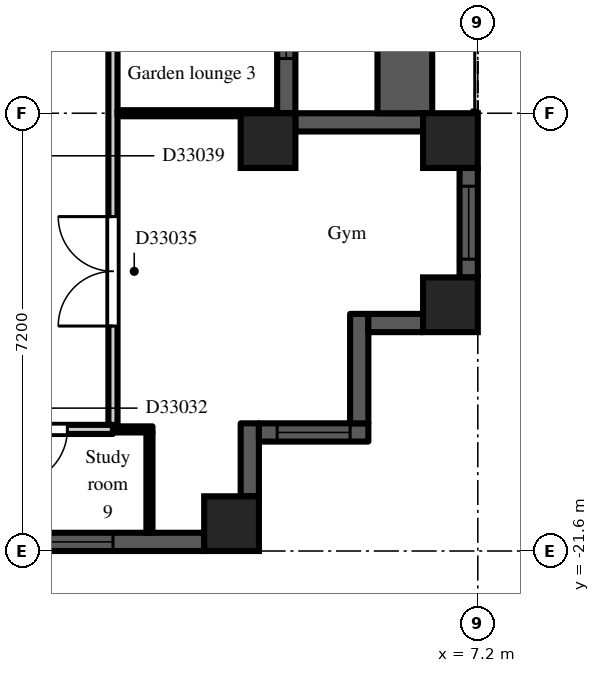
"""IFC4 building model, lengths in metres.
Left out: names, types, materials, properties, quantities, classifications, styles, units other than length and angle.
Written with IfcOpenShell. Run it as: python <this file> out.ifc"""

import sys

from ifc_helpers import new_model, si_unit, direction, frame, frame_2d, origin, origin_2d, place, context, subcontext, project, spatial, rectangle, extrude, element, fill, save


model = new_model("IFC4")
c1 = context("Model", 3, precision=1e-05, world=origin(), true_north=direction((0.0, 1.0)))
c2 = subcontext(c1, "Body", "Model", "MODEL_VIEW")
j1 = project(units=[si_unit("LENGTHUNIT", "METRE"), si_unit("PLANEANGLEUNIT", "RADIAN")], contexts=[c1])
p1 = place(None, origin())
s1 = spatial("IfcSite", under=j1, at=p1, CompositionType="ELEMENT")
p2 = place(p1, origin())
s2 = spatial("IfcBuilding", under=s1, at=p2, CompositionType="ELEMENT")
p3 = place(p2, frame((0.0, 0.0, 231.9)))
s3 = spatial("IfcBuildingStorey", under=s2, at=p3, CompositionType="ELEMENT", Elevation=231.9)
for number, where, z_axis, x_axis in (
    (1, (3.15, -21.15, 0.0), (0.0, 0.0, 1.0), (1.0, 0.0, 0.0)),
    (2, (3.75, -14.85, 0.0), (0.0, 0.0, 1.0), (1.0, 0.0, 0.0)),
    (3, (6.75, -17.55, 0.0), (0.0, 0.0, 1.0), (1.0, 0.0, 0.0)),
    (4, (6.75, -14.85, 0.0), (0.0, 0.0, 1.0), (1.0, 0.0, 0.0)),
):
    element("IfcColumn", number, at=place(p3, frame(where, z_axis=z_axis, x_axis=x_axis)), inside=s3, PredefinedType="COLUMN", context=c2, shape_type="SweptSolid", body=[
        extrude(rectangle(XDim=0.9, YDim=0.9, at=origin_2d()), origin(), (0.0, 0.0, 1.0), 3.0),
    ])
p4 = place(p3, frame((-2.7, -21.45, 0.0), z_axis=(0.0, 0.0, 1.0), x_axis=(1.0, 0.0, 0.0)))
e5 = element("IfcWall", 5, at=p4, inside=s3, PredefinedType="SOLIDWALL", context=c2, shape_type="SweptSolid", body=[
    extrude(rectangle(XDim=5.4, YDim=0.3, at=frame_2d((2.7, 0.0))), origin(), (0.0, 0.0, 1.0), 2.3),
])
p5 = place(p4, frame((1.5, 0.0, 0.2)))
e6 = element("IfcOpeningElement", 6, at=p5, cuts=e5, PredefinedType="OPENING", context=c2, shape_type="SweptSolid", body=[
    extrude(rectangle(XDim=2.4, YDim=1.85, at=frame_2d((1.2, 0.925))), frame((0.0, 0.16, 0.0), z_axis=(0.0, -1.0, 0.0), x_axis=(1.0, 0.0, 0.0)), (0.0, 0.0, 1.0), 0.32),
])
p6 = place(p3, frame((3.45, -20.7, 0.0), z_axis=(0.0, 0.0, 1.0), x_axis=(0.0, 1.0, 0.0)))
e7 = element("IfcWall", 7, at=p6, inside=s3, PredefinedType="SOLIDWALL", context=c2, shape_type="SweptSolid", body=[
    extrude(rectangle(XDim=1.2, YDim=0.3, at=frame_2d((0.6, 0.0))), origin(), (0.0, 0.0, 1.0), 2.6),
])
p7 = place(p3, frame((3.6, -19.65, 0.0), z_axis=(0.0, 0.0, 1.0), x_axis=(1.0, 0.0, 0.0)))
e8 = element("IfcWall", 8, at=p7, inside=s3, PredefinedType="SOLIDWALL", context=c2, shape_type="SweptSolid", body=[
    extrude(rectangle(XDim=1.8, YDim=0.3, at=frame_2d((0.9, 0.0))), origin(), (0.0, 0.0, 1.0), 2.6),
])
p8 = place(p7, frame((0.3, 0.0, 0.2)))
e9 = element("IfcOpeningElement", 9, at=p8, cuts=e8, PredefinedType="OPENING", context=c2, shape_type="SweptSolid", body=[
    extrude(rectangle(XDim=1.2, YDim=1.85, at=frame_2d((0.6, 0.925))), frame((0.0, 0.16, 0.0), z_axis=(0.0, -1.0, 0.0), x_axis=(1.0, 0.0, 0.0)), (0.0, 0.0, 1.0), 0.32),
])
p9 = place(p3, frame((5.25, -19.5, 0.0), z_axis=(0.0, 0.0, 1.0), x_axis=(0.0, 1.0, 0.0)))
e10 = element("IfcWall", 10, at=p9, inside=s3, PredefinedType="SOLIDWALL", context=c2, shape_type="SweptSolid", body=[
    extrude(rectangle(XDim=1.8, YDim=0.3, at=frame_2d((0.9, 0.0))), origin(), (0.0, 0.0, 1.0), 2.6),
])
p10 = place(p3, frame((5.4, -17.85, 0.0), z_axis=(0.0, 0.0, 1.0), x_axis=(1.0, 0.0, 0.0)))
e11 = element("IfcWall", 11, at=p10, inside=s3, PredefinedType="SOLIDWALL", context=c2, shape_type="SweptSolid", body=[
    extrude(rectangle(XDim=0.9, YDim=0.3, at=frame_2d((0.45, 0.0))), origin(), (0.0, 0.0, 1.0), 2.6),
])
p11 = place(p3, frame((7.05, -17.1, 0.0), z_axis=(0.0, 0.0, 1.0), x_axis=(0.0, 1.0, 0.0)))
e12 = element("IfcWall", 12, at=p11, inside=s3, PredefinedType="SOLIDWALL", context=c2, shape_type="SweptSolid", body=[
    extrude(rectangle(XDim=1.8, YDim=0.3, at=frame_2d((0.9, 0.0))), origin(), (0.0, 0.0, 1.0), 2.3),
])
p12 = place(p11, frame((0.3, 0.0, 0.2)))
e13 = element("IfcOpeningElement", 13, at=p12, cuts=e12, PredefinedType="OPENING", context=c2, shape_type="SweptSolid", body=[
    extrude(rectangle(XDim=1.2, YDim=1.85, at=frame_2d((0.6, 0.925))), frame((0.0, 0.16, 0.0), z_axis=(0.0, -1.0, 0.0), x_axis=(1.0, 0.0, 0.0)), (0.0, 0.0, 1.0), 0.32),
])
p13 = place(p3, frame((6.3, -14.55, 0.0), z_axis=(0.0, 0.0, 1.0), x_axis=(-1.0, 0.0, 0.0)))
e14 = element("IfcWall", 14, at=p13, inside=s3, PredefinedType="SOLIDWALL", context=c2, shape_type="SweptSolid", body=[
    extrude(rectangle(XDim=2.1, YDim=0.3, at=frame_2d((1.05, 0.0))), origin(), (0.0, 0.0, 1.0), 2.3),
])
p14 = place(p3, frame((4.05, -14.4, 0.0), z_axis=(0.0, 0.0, 1.0), x_axis=(0.0, 1.0, 0.0)))
e15 = element("IfcWall", 15, at=p14, inside=s3, PredefinedType="SOLIDWALL", context=c2, shape_type="SweptSolid", body=[
    extrude(rectangle(XDim=7.2, YDim=0.3, at=frame_2d((3.6, 0.0))), origin(), (0.0, 0.0, 1.0), 2.3),
])
p15 = place(p14, frame((3.0, 0.0, 0.0)))
e16 = element("IfcOpeningElement", 16, at=p15, cuts=e15, PredefinedType="OPENING", context=c2, shape_type="SweptSolid", body=[
    extrude(rectangle(XDim=1.2, YDim=2.05, at=frame_2d((0.6, 1.025))), frame((0.0, 0.16, 0.0), z_axis=(0.0, -1.0, 0.0), x_axis=(1.0, 0.0, 0.0)), (0.0, 0.0, 1.0), 0.32),
])
p16 = place(p14, frame((0.9, 0.0, 0.2)))
e17 = element("IfcOpeningElement", 17, at=p16, cuts=e15, PredefinedType="OPENING", context=c2, shape_type="SweptSolid", body=[
    extrude(rectangle(XDim=1.8, YDim=1.85, at=frame_2d((0.9, 0.925))), frame((0.0, 0.16, 0.0), z_axis=(0.0, -1.0, 0.0), x_axis=(1.0, 0.0, 0.0)), (0.0, 0.0, 1.0), 0.32),
])
p17 = place(p14, frame((4.5, 0.0, 0.2)))
e18 = element("IfcOpeningElement", 18, at=p17, cuts=e15, PredefinedType="OPENING", context=c2, shape_type="SweptSolid", body=[
    extrude(rectangle(XDim=1.8, YDim=1.85, at=frame_2d((0.9, 0.925))), frame((0.0, 0.16, 0.0), z_axis=(0.0, -1.0, 0.0), x_axis=(1.0, 0.0, 0.0)), (0.0, 0.0, 1.0), 0.32),
])
p18 = place(p3, frame((6.0, -14.4, 0.0), z_axis=(0.0, 0.0, 1.0), x_axis=(0.0, 1.0, 0.0)))
e19 = element("IfcWall", 19, at=p18, inside=s3, PredefinedType="PARAPET", context=c2, shape_type="SweptSolid", body=[
    extrude(rectangle(XDim=7.2, YDim=0.9, at=frame_2d((3.6, 0.0))), origin(), (0.0, 0.0, 1.0), 0.8),
])
p19 = place(p3, frame((-1.2, -19.6, 0.0), z_axis=(0.0, 0.0, 1.0), x_axis=(1.0, 0.0, 0.0)))
e20 = element("IfcWall", 20, at=p19, inside=s3, PredefinedType="PARTITIONING", context=c2, shape_type="SweptSolid", body=[
    extrude(rectangle(XDim=2.4, YDim=0.15, at=frame_2d((1.2, 0.0))), origin(), (0.0, 0.0, 1.0), 2.6),
])
p20 = place(p19, frame((0.75, 0.0, 0.0)))
e21 = element("IfcOpeningElement", 21, at=p20, cuts=e20, PredefinedType="OPENING", context=c2, shape_type="SweptSolid", body=[
    extrude(rectangle(XDim=0.9, YDim=2.1, at=frame_2d((0.45, 1.05))), frame((0.0, 0.085, 0.0), z_axis=(0.0, -1.0, 0.0), x_axis=(1.0, 0.0, 0.0)), (0.0, 0.0, 1.0), 0.17),
])
p21 = place(p3, frame((1.2, -19.525, 0.0), z_axis=(0.0, 0.0, 1.0), x_axis=(0.0, 1.0, 0.0)))
e22 = element("IfcWall", 22, at=p21, inside=s3, PredefinedType="PARTITIONING", context=c2, shape_type="SweptSolid", body=[
    extrude(rectangle(XDim=18.4, YDim=0.15, at=frame_2d((9.2, 0.0))), origin(), (0.0, 0.0, 1.0), 2.6),
])
p22 = place(p21, frame((14.875, 0.0, 0.0)))
e23 = element("IfcOpeningElement", 23, at=p22, cuts=e22, PredefinedType="OPENING", context=c2, shape_type="SweptSolid", body=[
    extrude(rectangle(XDim=0.9, YDim=2.1, at=frame_2d((0.45, 1.05))), frame((0.0, 0.085, 0.0), z_axis=(0.0, -1.0, 0.0), x_axis=(1.0, 0.0, 0.0)), (0.0, 0.0, 1.0), 0.17),
])
p23 = place(p21, frame((10.475, 0.0, 0.0)))
e24 = element("IfcOpeningElement", 24, at=p23, cuts=e22, PredefinedType="OPENING", context=c2, shape_type="SweptSolid", body=[
    extrude(rectangle(XDim=0.9, YDim=2.1, at=frame_2d((0.45, 1.05))), frame((0.0, 0.085, 0.0), z_axis=(0.0, -1.0, 0.0), x_axis=(1.0, 0.0, 0.0)), (0.0, 0.0, 1.0), 0.17),
])
p24 = place(p21, frame((6.875, 0.0, 0.0)))
e25 = element("IfcOpeningElement", 25, at=p24, cuts=e22, PredefinedType="OPENING", context=c2, shape_type="SweptSolid", body=[
    extrude(rectangle(XDim=0.9, YDim=2.1, at=frame_2d((0.45, 1.05))), frame((0.0, 0.085, 0.0), z_axis=(0.0, -1.0, 0.0), x_axis=(1.0, 0.0, 0.0)), (0.0, 0.0, 1.0), 0.17),
])
p25 = place(p21, frame((1.625, 0.0, 0.0)))
e26 = element("IfcOpeningElement", 26, at=p25, cuts=e22, PredefinedType="OPENING", context=c2, shape_type="SweptSolid", body=[
    extrude(rectangle(XDim=1.8, YDim=2.1, at=frame_2d((0.9, 1.05))), frame((0.0, 0.085, 0.0), z_axis=(0.0, -1.0, 0.0), x_axis=(1.0, 0.0, 0.0)), (0.0, 0.0, 1.0), 0.17),
])
p26 = place(p3, frame((1.2, -19.6, 0.0), z_axis=(0.0, 0.0, 1.0), x_axis=(1.0, 0.0, 0.0)))
e27 = element("IfcWall", 27, at=p26, inside=s3, PredefinedType="PARTITIONING", context=c2, shape_type="SweptSolid", body=[
    extrude(rectangle(XDim=0.65, YDim=0.1, at=frame_2d((0.325, 0.0))), origin(), (0.0, 0.0, 1.0), 2.6),
])
p27 = place(p3, frame((1.275, -14.4, 0.0), z_axis=(0.0, 0.0, 1.0), x_axis=(1.0, 0.0, 0.0)))
e28 = element("IfcWall", 28, at=p27, inside=s3, PredefinedType="PARTITIONING", context=c2, shape_type="SweptSolid", body=[
    extrude(rectangle(XDim=2.625, YDim=0.1, at=frame_2d((1.312, 0.0))), origin(), (0.0, 0.0, 1.0), 2.6),
])
p28 = place(p3, frame((1.8, -21.3, 0.0), z_axis=(0.0, 0.0, 1.0), x_axis=(0.0, 1.0, 0.0)))
e29 = element("IfcWall", 29, at=p28, inside=s3, PredefinedType="PARTITIONING", context=c2, shape_type="SweptSolid", body=[
    extrude(rectangle(XDim=1.65, YDim=0.1, at=frame_2d((0.825, 0.0))), origin(), (0.0, 0.0, 1.0), 2.6),
])
p29 = place(p5, origin())
e30 = element("IfcWindow", 30, at=p29, inside=s3, PartitioningType="SINGLE_PANEL", PredefinedType="WINDOW", context=c2, shape_type="SweptSolid", body=[
    extrude(rectangle(XDim=2.4, YDim=1.85, at=frame_2d((1.2, 0.925))), frame((0.0, 0.03, 0.0), z_axis=(0.0, -1.0, 0.0), x_axis=(1.0, 0.0, 0.0)), (0.0, 0.0, 1.0), 0.06),
])
fill(e6, e30)
p30 = place(p8, origin())
e31 = element("IfcWindow", 31, at=p30, inside=s3, PartitioningType="SINGLE_PANEL", PredefinedType="WINDOW", context=c2, shape_type="SweptSolid", body=[
    extrude(rectangle(XDim=1.2, YDim=1.85, at=frame_2d((0.6, 0.925))), frame((0.0, 0.03, 0.0), z_axis=(0.0, -1.0, 0.0), x_axis=(1.0, 0.0, 0.0)), (0.0, 0.0, 1.0), 0.06),
])
fill(e9, e31)
p31 = place(p12, origin())
e32 = element("IfcWindow", 32, at=p31, inside=s3, PartitioningType="SINGLE_PANEL", PredefinedType="WINDOW", context=c2, shape_type="SweptSolid", body=[
    extrude(rectangle(XDim=1.2, YDim=1.85, at=frame_2d((0.6, 0.925))), frame((0.0, 0.03, 0.0), z_axis=(0.0, -1.0, 0.0), x_axis=(1.0, 0.0, 0.0)), (0.0, 0.0, 1.0), 0.06),
])
fill(e13, e32)
p32 = place(p16, origin())
e33 = element("IfcWindow", 33, at=p32, inside=s3, PartitioningType="SINGLE_PANEL", PredefinedType="WINDOW", context=c2, shape_type="SweptSolid", body=[
    extrude(rectangle(XDim=1.8, YDim=1.85, at=frame_2d((0.9, 0.925))), frame((0.0, 0.03, 0.0), z_axis=(0.0, -1.0, 0.0), x_axis=(1.0, 0.0, 0.0)), (0.0, 0.0, 1.0), 0.06),
])
fill(e17, e33)
p33 = place(p20, frame((0.9, 0.0, 0.0), z_axis=(0.0, 0.0, 1.0), x_axis=(-1.0, 0.0, 0.0)))
e34 = element("IfcDoor", 34, at=p33, inside=s3, OperationType="SINGLE_SWING_RIGHT", PredefinedType="DOOR", context=c2, shape_type="SweptSolid", body=[
    extrude(rectangle(XDim=0.9, YDim=2.1, at=frame_2d((0.45, 1.05))), frame((0.0, 0.025, 0.0), z_axis=(0.0, -1.0, 0.0), x_axis=(1.0, 0.0, 0.0)), (0.0, 0.0, 1.0), 0.05),
])
fill(e21, e34)
p34 = place(p25, origin())
e35 = element("IfcDoor", 35, at=p34, inside=s3, OperationType="DOUBLE_DOOR_DOUBLE_SWING", PredefinedType="DOOR", context=c2, shape_type="SweptSolid", body=[
    extrude(rectangle(XDim=1.8, YDim=2.1, at=frame_2d((0.9, 1.05))), frame((0.0, 0.025, 0.0), z_axis=(0.0, -1.0, 0.0), x_axis=(1.0, 0.0, 0.0)), (0.0, 0.0, 1.0), 0.05),
])
fill(e26, e35)
save(model, sys.argv[1])
